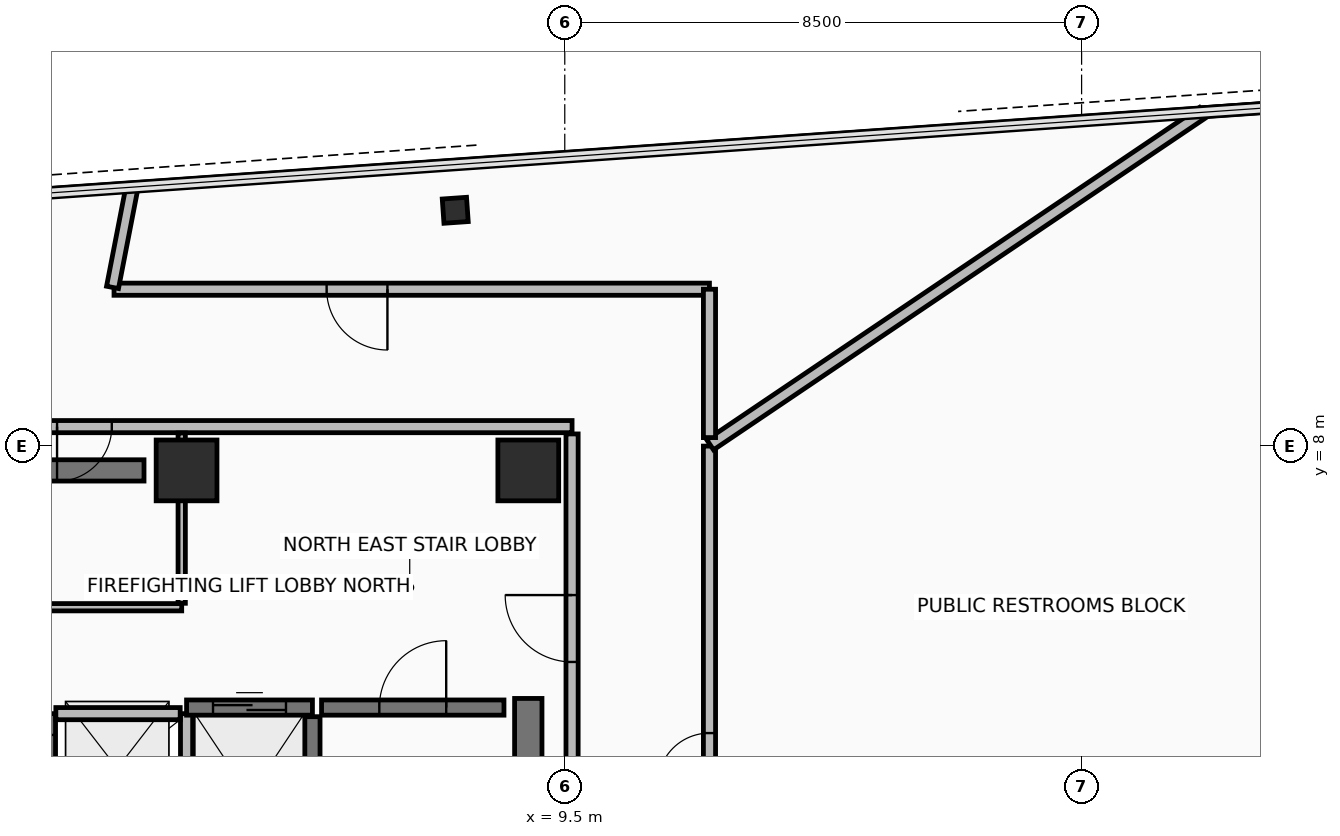
"""IFC4 building model, lengths in metres.
Left out: names, types, materials, properties, quantities, classifications, styles, units other than length and angle.
Written with IfcOpenShell. Run it as: python <this file> out.ifc"""

import sys

from ifc_helpers import new_model, si_unit, direction, frame, frame_2d, origin, origin_2d, place, context, subcontext, project, spatial, rectangle, hollow_rectangle, extrude, element, fill, save


model = new_model("IFC4")
c1 = context("Model", 3, precision=1e-05, world=origin(), true_north=direction((0.0, 1.0)))
c2 = subcontext(c1, "Body", "Model", "MODEL_VIEW")
j1 = project(units=[si_unit("LENGTHUNIT", "METRE"), si_unit("PLANEANGLEUNIT", "RADIAN")], contexts=[c1])
p1 = place(None, origin())
s1 = spatial("IfcSite", under=j1, at=p1, CompositionType="ELEMENT")
p2 = place(p1, origin())
s2 = spatial("IfcBuilding", under=s1, at=p2, CompositionType="ELEMENT")
p3 = place(p2, frame((0.0, 0.0, 264.2)))
s3 = spatial("IfcBuildingStorey", under=s2, at=p3, CompositionType="ELEMENT", Elevation=264.2)
for number, where, z_axis, x_axis in (
    (1, (8.9, 7.6, 0.0), (0.0, 0.0, 1.0), (1.0, 0.0, 0.0)),
    (2, (3.28, 7.6, 0.0), (0.0, 0.0, 1.0), (1.0, 0.0, 0.0)),
):
    element("IfcColumn", number, at=place(p3, frame(where, z_axis=z_axis, x_axis=x_axis)), inside=s3, PredefinedType="COLUMN", context=c2, shape_type="SweptSolid", body=[
        extrude(rectangle(XDim=1.0, YDim=1.0, at=origin_2d()), origin(), (0.0, 0.0, 1.0), 3.6),
    ])
p4 = place(p3, frame((7.699, 11.878, 0.0), z_axis=(0.0, 0.0, 1.0), x_axis=(0.99756392851, 0.069758214822, 0.0)))
e3 = element("IfcColumn", 3, at=p4, inside=s3, PredefinedType="COLUMN", context=c2, shape_type="SweptSolid", body=[
    extrude(hollow_rectangle(XDim=0.4, YDim=0.4, WallThickness=0.025, at=origin_2d()), origin(), (0.0, 0.0, 1.0), 3.6),
])
p5 = place(p3, frame((-2.8, 7.6, 0.0), z_axis=(0.0, 0.0, 1.0), x_axis=(1.0, 0.0, 0.0)))
e4 = element("IfcWall", 4, at=p5, inside=s3, PredefinedType="SHEAR", context=c2, shape_type="SweptSolid", body=[
    extrude(rectangle(XDim=5.38, YDim=0.35, at=frame_2d((2.69, 0.0))), origin(), (0.0, 0.0, 1.0), 3.42),
])
p6 = place(p3, frame((8.9, -6.85, 0.0), z_axis=(0.0, 0.0, 1.0), x_axis=(0.0, 1.0, 0.0)))
e5 = element("IfcWall", 5, at=p6, inside=s3, PredefinedType="SHEAR", context=c2, shape_type="SweptSolid", body=[
    extrude(rectangle(XDim=10.7, YDim=0.45, at=frame_2d((5.35, 0.0))), origin(), (0.0, 0.0, 1.0), 3.42),
])
p7 = place(p3, frame((9.62, 8.32, 0.0), z_axis=(0.0, 0.0, 1.0), x_axis=(-1.0, 0.0, 0.0)))
e6 = element("IfcWall", 6, at=p7, inside=s3, PredefinedType="PARTITIONING", context=c2, shape_type="SweptSolid", body=[
    extrude(rectangle(XDim=19.24, YDim=0.2, at=frame_2d((9.62, 0.0))), origin(), (0.0, 0.0, 1.0), 2.915),
])
p8 = place(p7, frame((10.97, 0.0, 0.0)))
e7 = element("IfcOpeningElement", 7, at=p8, cuts=e6, PredefinedType="OPENING", context=c2, shape_type="SweptSolid", body=[
    extrude(rectangle(XDim=0.9, YDim=2.1, at=frame_2d((0.45, 1.05))), frame((0.0, 0.11, 0.0), z_axis=(0.0, -1.0, 0.0), x_axis=(1.0, 0.0, 0.0)), (0.0, 0.0, 1.0), 0.22),
])
p9 = place(p7, frame((7.57, 0.0, 0.0)))
e8 = element("IfcOpeningElement", 8, at=p9, cuts=e6, PredefinedType="OPENING", context=c2, shape_type="SweptSolid", body=[
    extrude(rectangle(XDim=0.9, YDim=2.1, at=frame_2d((0.45, 1.05))), frame((0.0, 0.11, 0.0), z_axis=(0.0, -1.0, 0.0), x_axis=(1.0, 0.0, 0.0)), (0.0, 0.0, 1.0), 0.22),
])
p10 = place(p7, frame((16.245, 0.0, 0.0)))
e9 = element("IfcOpeningElement", 9, at=p10, cuts=e6, PredefinedType="OPENING", context=c2, shape_type="SweptSolid", body=[
    extrude(rectangle(XDim=0.9, YDim=2.1, at=frame_2d((0.45, 1.05))), frame((0.0, 0.11, 0.0), z_axis=(0.0, -1.0, 0.0), x_axis=(1.0, 0.0, 0.0)), (0.0, 0.0, 1.0), 0.22),
])
p11 = place(p7, frame((14.295, 0.0, 0.0)))
e10 = element("IfcOpeningElement", 10, at=p11, cuts=e6, PredefinedType="OPENING", context=c2, shape_type="SweptSolid", body=[
    extrude(rectangle(XDim=0.9, YDim=2.1, at=frame_2d((0.45, 1.05))), frame((0.0, 0.11, 0.0), z_axis=(0.0, -1.0, 0.0), x_axis=(1.0, 0.0, 0.0)), (0.0, 0.0, 1.0), 0.22),
])
p12 = place(p3, frame((9.62, -8.2, 0.0), z_axis=(0.0, 0.0, 1.0), x_axis=(0.0, 1.0, 0.0)))
e11 = element("IfcWall", 11, at=p12, inside=s3, PredefinedType="PARTITIONING", context=c2, shape_type="SweptSolid", body=[
    extrude(rectangle(XDim=16.4, YDim=0.2, at=frame_2d((8.2, 0.0))), origin(), (0.0, 0.0, 1.0), 2.915),
])
p13 = place(p12, frame((12.65, 0.0, 0.0)))
e12 = element("IfcOpeningElement", 12, at=p13, cuts=e11, PredefinedType="OPENING", context=c2, shape_type="SweptSolid", body=[
    extrude(rectangle(XDim=1.1, YDim=2.15, at=frame_2d((0.55, 1.075))), frame((0.0, 0.11, 0.0), z_axis=(0.0, -1.0, 0.0), x_axis=(1.0, 0.0, 0.0)), (0.0, 0.0, 1.0), 0.22),
])
p14 = place(p3, frame((5.35, -3.75, 0.0), z_axis=(0.0, 0.0, 1.0), x_axis=(0.0, 1.0, 0.0)))
e13 = element("IfcWall", 13, at=p14, inside=s3, PredefinedType="SHEAR", context=c2, shape_type="SweptSolid", body=[
    extrude(rectangle(XDim=7.3, YDim=0.25, at=frame_2d((3.65, 0.0))), origin(), (0.0, 0.0, 1.0), 3.42),
])
p15 = place(p3, frame((5.5, 3.7, 0.0), z_axis=(0.0, 0.0, 1.0), x_axis=(1.0, 0.0, 0.0)))
e14 = element("IfcWall", 14, at=p15, inside=s3, PredefinedType="SHEAR", context=c2, shape_type="SweptSolid", body=[
    extrude(rectangle(XDim=3.0, YDim=0.25, at=frame_2d((1.5, 0.0))), origin(), (0.0, 0.0, 1.0), 3.42),
])
p16 = place(p15, frame((0.95, 0.0, 0.0)))
e15 = element("IfcOpeningElement", 15, at=p16, cuts=e14, PredefinedType="OPENING", context=c2, shape_type="SweptSolid", body=[
    extrude(rectangle(XDim=1.1, YDim=2.15, at=frame_2d((0.55, 1.075))), frame((0.0, 0.135, 0.0), z_axis=(0.0, -1.0, 0.0), x_axis=(1.0, 0.0, 0.0)), (0.0, 0.0, 1.0), 0.27),
])
p17 = place(p3, frame((1.0, 1.8, 0.0), z_axis=(0.0, 0.0, 1.0), x_axis=(0.0, 1.0, 0.0)))
e16 = element("IfcWall", 16, at=p17, inside=s3, PredefinedType="SHEAR", context=c2, shape_type="SweptSolid", body=[
    extrude(rectangle(XDim=1.8, YDim=0.25, at=frame_2d((0.9, 0.0))), origin(), (0.0, 0.0, 1.0), 3.42),
])
p18 = place(p17, frame((0.35, 0.0, 0.0)))
e17 = element("IfcOpeningElement", 17, at=p18, cuts=e16, PredefinedType="OPENING", context=c2, shape_type="SweptSolid", body=[
    extrude(rectangle(XDim=1.1, YDim=2.2, at=frame_2d((0.55, 1.1))), frame((0.0, 0.135, 0.0), z_axis=(0.0, -1.0, 0.0), x_axis=(1.0, 0.0, 0.0)), (0.0, 0.0, 1.0), 0.27),
])
p19 = place(p3, frame((3.28, 1.8, 0.0), z_axis=(0.0, 0.0, 1.0), x_axis=(0.0, 1.0, 0.0)))
e18 = element("IfcWall", 18, at=p19, inside=s3, PredefinedType="PARTITIONING", context=c2, shape_type="SweptSolid", body=[
    extrude(rectangle(XDim=1.8, YDim=0.2, at=frame_2d((0.9, 0.0))), origin(), (0.0, 0.0, 1.0), 3.42),
])
p20 = place(p3, frame((1.13, 3.6, 0.0), z_axis=(0.0, 0.0, 1.0), x_axis=(1.0, 0.0, 0.0)))
e19 = element("IfcWall", 19, at=p20, inside=s3, PredefinedType="PARTITIONING", context=c2, shape_type="SweptSolid", body=[
    extrude(rectangle(XDim=2.045, YDim=0.2, at=frame_2d((1.022, 0.0))), origin(), (0.0, 0.0, 1.0), 2.715),
])
p21 = place(p3, frame((3.28, 3.7, 0.0), z_axis=(0.0, 0.0, 1.0), x_axis=(1.0, 0.0, 0.0)))
e20 = element("IfcWall", 20, at=p21, inside=s3, PredefinedType="SHEAR", context=c2, shape_type="SweptSolid", body=[
    extrude(rectangle(XDim=2.07, YDim=0.25, at=frame_2d((1.035, 0.0))), origin(), (0.0, 0.0, 1.0), 3.42),
])
p22 = place(p21, frame((0.435, 0.0, 0.0)))
e21 = element("IfcOpeningElement", 21, at=p22, cuts=e20, PredefinedType="OPENING", context=c2, shape_type="SweptSolid", body=[
    extrude(rectangle(XDim=1.2, YDim=2.2, at=frame_2d((0.6, 1.1))), frame((0.0, 0.135, 0.0), z_axis=(0.0, -1.0, 0.0), x_axis=(1.0, 0.0, 0.0)), (0.0, 0.0, 1.0), 0.27),
])
p23 = place(p3, frame((0.0, 5.35, 0.0), z_axis=(0.0, 0.0, 1.0), x_axis=(1.0, 0.0, 0.0)))
e22 = element("IfcWall", 22, at=p23, inside=s3, PredefinedType="PARTITIONING", context=c2, shape_type="SweptSolid", body=[
    extrude(rectangle(XDim=3.2, YDim=0.12, at=frame_2d((1.6, 0.0))), origin(), (0.0, 0.0, 1.0), 2.715),
])
p24 = place(p3, frame((3.2, 5.415, 0.0), z_axis=(0.0, 0.0, 1.0), x_axis=(0.0, 1.0, 0.0)))
e23 = element("IfcWall", 23, at=p24, inside=s3, PredefinedType="PARTITIONING", context=c2, shape_type="SweptSolid", body=[
    extrude(rectangle(XDim=2.8, YDim=0.12, at=frame_2d((1.4, 0.0))), origin(), (0.0, 0.0, 1.0), 2.715),
])
p25 = place(p3, frame((26.077, 10.228, 0.0), z_axis=(0.0, 0.0, 1.0), x_axis=(-0.438373442237, -0.898792926731, 0.0)))
e24 = element("IfcWall", 24, at=p25, inside=s3, PredefinedType="PARTITIONING", context=c2, shape_type="SweptSolid", body=[
    extrude(rectangle(XDim=15.526, YDim=0.15, at=frame_2d((7.763, 0.0))), origin(), (0.0, 0.0, 1.0), 3.42),
])
p26 = place(p3, frame((11.88, -2.289, 0.0), z_axis=(0.0, 0.0, 1.0), x_axis=(0.0, 1.0, 0.0)))
e25 = element("IfcWall", 25, at=p26, inside=s3, PredefinedType="PARTITIONING", context=c2, shape_type="SweptSolid", body=[
    extrude(rectangle(XDim=10.289, YDim=0.2, at=frame_2d((5.144, 0.0))), origin(), (0.0, 0.0, 1.0), 2.915),
])
p27 = place(p26, frame((4.719, 0.0, 0.0)))
e26 = element("IfcOpeningElement", 26, at=p27, cuts=e25, PredefinedType="OPENING", context=c2, shape_type="SweptSolid", body=[
    extrude(rectangle(XDim=0.85, YDim=2.1, at=frame_2d((0.425, 1.05))), frame((0.0, 0.11, 0.0), z_axis=(0.0, -1.0, 0.0), x_axis=(1.0, 0.0, 0.0)), (0.0, 0.0, 1.0), 0.22),
])
p28 = place(p3, frame((11.891, 8.021, 0.0), z_axis=(0.0, 0.0, 1.0), x_axis=(0.829032808976, 0.559199965702, 0.0)))
e27 = element("IfcWall", 27, at=p28, inside=s3, PredefinedType="PARTITIONING", context=c2, shape_type="SweptSolid", body=[
    extrude(rectangle(XDim=9.773, YDim=0.2, at=frame_2d((4.887, 0.0))), origin(), (0.0, 0.0, 1.0), 2.765),
])
p29 = place(p3, frame((20.006, 13.49, 0.0), z_axis=(0.0, 0.0, 1.0), x_axis=(0.997566581232, 0.069720269715, 0.0)))
e28 = element("IfcWall", 28, at=p29, inside=s3, PredefinedType="PARTITIONING", context=c2, shape_type="SweptSolid", body=[
    extrude(rectangle(XDim=3.705, YDim=0.15, at=frame_2d((1.853, 0.0))), origin(), (0.0, 0.0, 1.0), 3.42),
])
p30 = place(p3, frame((11.879, 10.58, 0.0), z_axis=(0.0, 0.0, 1.0), x_axis=(-1.0, 0.0, 0.0)))
e29 = element("IfcWall", 29, at=p30, inside=s3, PredefinedType="PARTITIONING", context=c2, shape_type="SweptSolid", body=[
    extrude(rectangle(XDim=9.792, YDim=0.2, at=frame_2d((4.896, 0.0))), origin(), (0.0, 0.0, 1.0), 2.915),
])
p31 = place(p30, frame((5.296, 0.0, 0.0)))
e30 = element("IfcOpeningElement", 30, at=p31, cuts=e29, PredefinedType="OPENING", context=c2, shape_type="SweptSolid", body=[
    extrude(rectangle(XDim=1.0, YDim=2.15, at=frame_2d((0.5, 1.075))), frame((0.0, 0.11, 0.0), z_axis=(0.0, -1.0, 0.0), x_axis=(1.0, 0.0, 0.0)), (0.0, 0.0, 1.0), 0.22),
])
p32 = place(p3, frame((2.062, 10.61, 0.0), z_axis=(0.0, 0.0, 1.0), x_axis=(0.190794848405, 0.981629933235, 0.0)))
e31 = element("IfcWall", 31, at=p32, inside=s3, PredefinedType="PARTITIONING", context=c2, shape_type="SweptSolid", body=[
    extrude(rectangle(XDim=1.66, YDim=0.2, at=frame_2d((0.83, 0.0))), origin(), (0.0, 0.0, 1.0), 2.765),
])
p33 = place(p3, frame((11.88, 8.14, 0.0), z_axis=(0.0, 0.0, 1.0), x_axis=(0.0, 1.0, 0.0)))
e32 = element("IfcWall", 32, at=p33, inside=s3, PredefinedType="PARTITIONING", context=c2, shape_type="SweptSolid", body=[
    extrude(rectangle(XDim=2.439, YDim=0.2, at=frame_2d((1.22, 0.0))), origin(), (0.0, 0.0, 1.0), 2.915),
])
p34 = place(p13, frame((1.1, 0.0, 0.0), z_axis=(0.0, 0.0, 1.0), x_axis=(-1.0, 0.0, 0.0)))
e33 = element("IfcDoor", 33, at=p34, inside=s3, OperationType="SINGLE_SWING_LEFT", PredefinedType="DOOR", context=c2, shape_type="SweptSolid", body=[
    extrude(rectangle(XDim=1.1, YDim=2.15, at=frame_2d((0.55, 1.075))), frame((0.0, 0.025, 0.0), z_axis=(0.0, -1.0, 0.0), x_axis=(1.0, 0.0, 0.0)), (0.0, 0.0, 1.0), 0.05),
])
fill(e12, e33)
p35 = place(p16, frame((1.1, 0.0, 0.0), z_axis=(0.0, 0.0, 1.0), x_axis=(-1.0, 0.0, 0.0)))
e34 = element("IfcDoor", 34, at=p35, inside=s3, OperationType="SINGLE_SWING_LEFT", PredefinedType="DOOR", context=c2, shape_type="SweptSolid", body=[
    extrude(rectangle(XDim=1.1, YDim=2.15, at=frame_2d((0.55, 1.075))), frame((0.0, 0.025, 0.0), z_axis=(0.0, -1.0, 0.0), x_axis=(1.0, 0.0, 0.0)), (0.0, 0.0, 1.0), 0.05),
])
fill(e15, e34)
p36 = place(p22, origin())
e35 = element("IfcDoor", 35, at=p36, inside=s3, OperationType="SLIDING_TO_RIGHT", PredefinedType="DOOR", context=c2, shape_type="SweptSolid", body=[
    extrude(rectangle(XDim=1.2, YDim=2.2, at=frame_2d((0.6, 1.1))), frame((0.0, 0.025, 0.0), z_axis=(0.0, -1.0, 0.0), x_axis=(1.0, 0.0, 0.0)), (0.0, 0.0, 1.0), 0.05),
])
fill(e21, e35)
p37 = place(p9, frame((0.9, 0.0, 0.0), z_axis=(0.0, 0.0, 1.0), x_axis=(-1.0, 0.0, 0.0)))
e36 = element("IfcDoor", 36, at=p37, inside=s3, OperationType="SINGLE_SWING_LEFT", PredefinedType="DOOR", context=c2, shape_type="SweptSolid", body=[
    extrude(rectangle(XDim=0.9, YDim=2.1, at=frame_2d((0.45, 1.05))), frame((0.0, 0.025, 0.0), z_axis=(0.0, -1.0, 0.0), x_axis=(1.0, 0.0, 0.0)), (0.0, 0.0, 1.0), 0.05),
])
fill(e8, e36)
p38 = place(p27, origin())
e37 = element("IfcDoor", 37, at=p38, inside=s3, OperationType="SINGLE_SWING_RIGHT", PredefinedType="DOOR", context=c2, shape_type="SweptSolid", body=[
    extrude(rectangle(XDim=0.85, YDim=2.1, at=frame_2d((0.425, 1.05))), frame((0.0, 0.025, 0.0), z_axis=(0.0, -1.0, 0.0), x_axis=(1.0, 0.0, 0.0)), (0.0, 0.0, 1.0), 0.05),
])
fill(e26, e37)
p39 = place(p31, origin())
e38 = element("IfcDoor", 38, at=p39, inside=s3, OperationType="SINGLE_SWING_RIGHT", PredefinedType="DOOR", context=c2, shape_type="SweptSolid", body=[
    extrude(rectangle(XDim=1.0, YDim=2.15, at=frame_2d((0.5, 1.075))), frame((0.0, 0.025, 0.0), z_axis=(0.0, -1.0, 0.0), x_axis=(1.0, 0.0, 0.0)), (0.0, 0.0, 1.0), 0.05),
])
fill(e30, e38)
save(model, sys.argv[1])
